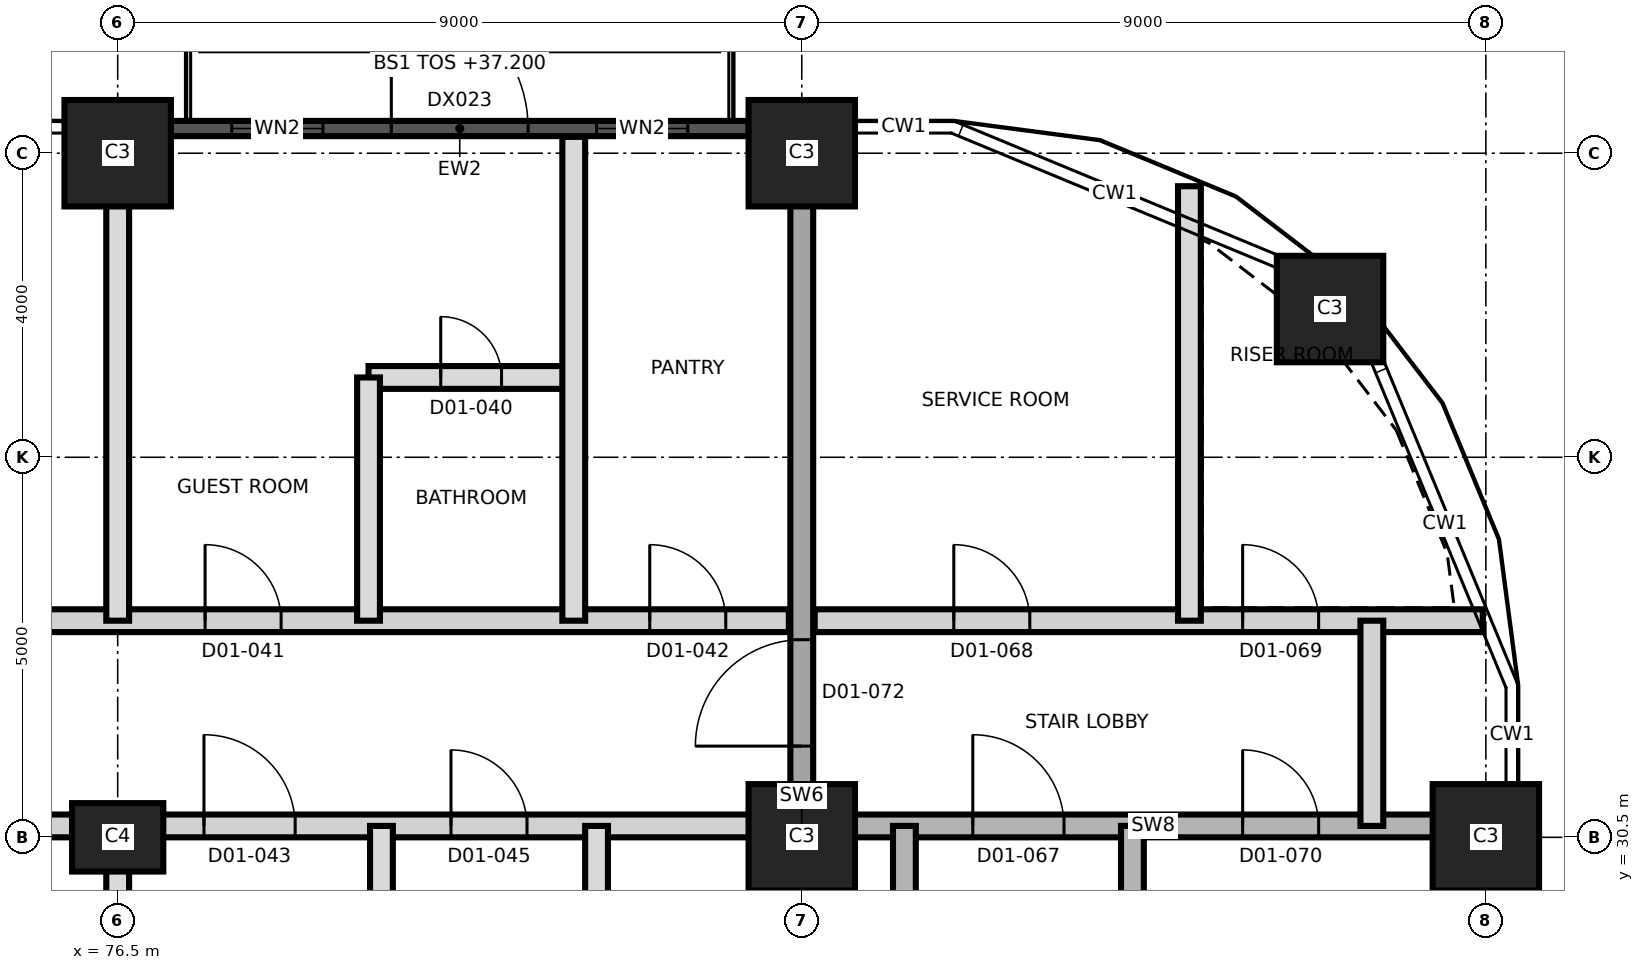
"""IFC4 building model, lengths in metres.
Left out: names, types, materials, properties, quantities, classifications, styles, units other than length and angle.
Written with IfcOpenShell. Run it as: python <this file> out.ifc"""

import sys

from ifc_helpers import new_model, si_unit, direction, frame, frame_2d, origin, origin_2d, place, context, subcontext, project, spatial, rectangle, extrude, element, fill, save


model = new_model("IFC4")
c1 = context("Model", 3, precision=1e-05, world=origin(), true_north=direction((0.0, 1.0)))
c2 = subcontext(c1, "Body", "Model", "MODEL_VIEW")
j1 = project(units=[si_unit("LENGTHUNIT", "METRE"), si_unit("PLANEANGLEUNIT", "RADIAN")], contexts=[c1])
p1 = place(None, origin())
s1 = spatial("IfcSite", under=j1, at=p1, CompositionType="ELEMENT")
p2 = place(p1, origin())
s2 = spatial("IfcBuilding", under=s1, at=p2, CompositionType="ELEMENT")
p3 = place(p2, frame((0.0, 0.0, 37.2)))
s3 = spatial("IfcBuildingStorey", under=s2, at=p3, CompositionType="ELEMENT", Elevation=37.2)
p4 = place(p3, frame((76.5, 30.5, 0.0), z_axis=(0.0, 0.0, 1.0), x_axis=(1.0, 0.0, 0.0)))
e1 = element("IfcColumn", 1, at=p4, inside=s3, PredefinedType="COLUMN", context=c2, shape_type="SweptSolid", body=[
    extrude(rectangle(XDim=1.2, YDim=0.9, at=origin_2d()), origin(), (0.0, 0.0, 1.0), 3.7),
])
for number, where, z_axis, x_axis in (
    (2, (85.5, 30.5, 0.0), (0.0, 0.0, 1.0), (1.0, 0.0, 0.0)),
    (3, (94.5, 30.5, 0.0), (0.0, 0.0, 1.0), (1.0, 0.0, 0.0)),
    (4, (92.45, 37.45, 0.0), (0.0, 0.0, 1.0), (1.0, 0.0, 0.0)),
    (5, (76.5, 39.5, 0.0), (0.0, 0.0, 1.0), (1.0, 0.0, 0.0)),
    (6, (85.5, 39.5, 0.0), (0.0, 0.0, 1.0), (1.0, 0.0, 0.0)),
):
    element("IfcColumn", number, at=place(p3, frame(where, z_axis=z_axis, x_axis=x_axis)), inside=s3, PredefinedType="COLUMN", context=c2, shape_type="SweptSolid", body=[
        extrude(rectangle(XDim=1.4, YDim=1.4, at=origin_2d()), origin(), (0.0, 0.0, 1.0), 3.7),
    ])
p5 = place(p3, frame((85.5, 21.425, 0.0), z_axis=(0.0, 0.0, 1.0), x_axis=(0.0, 1.0, 0.0)))
e7 = element("IfcWall", 7, at=p5, inside=s3, PredefinedType="SHEAR", context=c2, shape_type="SweptSolid", body=[
    extrude(rectangle(XDim=18.15, YDim=0.3, at=frame_2d((9.075, 0.0))), origin(), (0.0, 0.0, 1.0), 3.7),
])
p6 = place(p5, frame((10.275, 0.0, 0.0)))
e8 = element("IfcOpeningElement", 8, at=p6, cuts=e7, PredefinedType="OPENING", context=c2, shape_type="SweptSolid", body=[
    extrude(rectangle(XDim=1.4, YDim=2.1, at=frame_2d((0.7, 1.05))), frame((0.0, 0.16, 0.0), z_axis=(0.0, -1.0, 0.0), x_axis=(1.0, 0.0, 0.0)), (0.0, 0.0, 1.0), 0.32),
])
p7 = place(p3, frame((77.2, 39.825, 0.0), z_axis=(0.0, 0.0, 1.0), x_axis=(1.0, 0.0, 0.0)))
e9 = element("IfcWall", 9, at=p7, inside=s3, PredefinedType="SOLIDWALL", context=c2, shape_type="SweptSolid", body=[
    extrude(rectangle(XDim=7.6, YDim=0.2, at=frame_2d((3.8, 0.0))), origin(), (0.0, 0.0, 1.0), 3.4),
])
p8 = place(p7, frame((2.9, 0.0, 0.0)))
e10 = element("IfcOpeningElement", 10, at=p8, cuts=e9, PredefinedType="OPENING", context=c2, shape_type="SweptSolid", body=[
    extrude(rectangle(XDim=1.8, YDim=2.4, at=frame_2d((0.9, 1.2))), frame((0.0, 0.11, 0.0), z_axis=(0.0, -1.0, 0.0), x_axis=(1.0, 0.0, 0.0)), (0.0, 0.0, 1.0), 0.22),
])
p9 = place(p7, frame((5.6, 0.0, 0.9)))
e11 = element("IfcOpeningElement", 11, at=p9, cuts=e9, PredefinedType="OPENING", context=c2, shape_type="SweptSolid", body=[
    extrude(rectangle(XDim=1.2, YDim=2.1, at=frame_2d((0.6, 1.05))), frame((0.0, 0.11, 0.0), z_axis=(0.0, -1.0, 0.0), x_axis=(1.0, 0.0, 0.0)), (0.0, 0.0, 1.0), 0.22),
])
p10 = place(p7, frame((0.8, 0.0, 0.9)))
e12 = element("IfcOpeningElement", 12, at=p10, cuts=e9, PredefinedType="OPENING", context=c2, shape_type="SweptSolid", body=[
    extrude(rectangle(XDim=1.2, YDim=2.1, at=frame_2d((0.6, 1.05))), frame((0.0, 0.11, 0.0), z_axis=(0.0, -1.0, 0.0), x_axis=(1.0, 0.0, 0.0)), (0.0, 0.0, 1.0), 0.22),
])
p11 = place(p3, frame((58.95, 30.65, 0.0), z_axis=(0.0, 0.0, 1.0), x_axis=(1.0, 0.0, 0.0)))
e13 = element("IfcWall", 13, at=p11, inside=s3, PredefinedType="PARTITIONING", context=c2, shape_type="SweptSolid", body=[
    extrude(rectangle(XDim=26.38, YDim=0.3, at=frame_2d((13.19, 0.0))), origin(), (0.0, 0.0, 1.0), 3.4),
])
p12 = place(p11, frame((2.47, 0.0, 0.0)))
e14 = element("IfcOpeningElement", 14, at=p12, cuts=e13, PredefinedType="OPENING", context=c2, shape_type="SweptSolid", body=[
    extrude(rectangle(XDim=1.0, YDim=2.1, at=frame_2d((0.5, 1.05))), frame((0.0, 0.16, 0.0), z_axis=(0.0, -1.0, 0.0), x_axis=(1.0, 0.0, 0.0)), (0.0, 0.0, 1.0), 0.32),
])
p13 = place(p11, frame((4.27, 0.0, 0.0)))
e15 = element("IfcOpeningElement", 15, at=p13, cuts=e13, PredefinedType="OPENING", context=c2, shape_type="SweptSolid", body=[
    extrude(rectangle(XDim=1.0, YDim=2.1, at=frame_2d((0.5, 1.05))), frame((0.0, 0.16, 0.0), z_axis=(0.0, -1.0, 0.0), x_axis=(1.0, 0.0, 0.0)), (0.0, 0.0, 1.0), 0.32),
])
p14 = place(p11, frame((11.8, 0.0, 0.0)))
e16 = element("IfcOpeningElement", 16, at=p14, cuts=e13, PredefinedType="OPENING", context=c2, shape_type="SweptSolid", body=[
    extrude(rectangle(XDim=1.0, YDim=2.4, at=frame_2d((0.5, 1.2))), frame((0.0, 0.16, 0.0), z_axis=(0.0, -1.0, 0.0), x_axis=(1.0, 0.0, 0.0)), (0.0, 0.0, 1.0), 0.32),
])
p15 = place(p11, frame((13.3, 0.0, 0.0)))
e17 = element("IfcOpeningElement", 17, at=p15, cuts=e13, PredefinedType="OPENING", context=c2, shape_type="SweptSolid", body=[
    extrude(rectangle(XDim=1.0, YDim=2.4, at=frame_2d((0.5, 1.2))), frame((0.0, 0.16, 0.0), z_axis=(0.0, -1.0, 0.0), x_axis=(1.0, 0.0, 0.0)), (0.0, 0.0, 1.0), 0.32),
])
p16 = place(p11, frame((18.685, 0.0, 0.0)))
e18 = element("IfcOpeningElement", 18, at=p16, cuts=e13, PredefinedType="OPENING", context=c2, shape_type="SweptSolid", body=[
    extrude(rectangle(XDim=1.2, YDim=2.1, at=frame_2d((0.6, 1.05))), frame((0.0, 0.16, 0.0), z_axis=(0.0, -1.0, 0.0), x_axis=(1.0, 0.0, 0.0)), (0.0, 0.0, 1.0), 0.32),
])
p17 = place(p11, frame((21.935, 0.0, 0.0)))
e19 = element("IfcOpeningElement", 19, at=p17, cuts=e13, PredefinedType="OPENING", context=c2, shape_type="SweptSolid", body=[
    extrude(rectangle(XDim=1.0, YDim=2.1, at=frame_2d((0.5, 1.05))), frame((0.0, 0.16, 0.0), z_axis=(0.0, -1.0, 0.0), x_axis=(1.0, 0.0, 0.0)), (0.0, 0.0, 1.0), 0.32),
])
p18 = place(p3, frame((85.67, 30.65, 0.0), z_axis=(0.0, 0.0, 1.0), x_axis=(1.0, 0.0, 0.0)))
e20 = element("IfcWall", 20, at=p18, inside=s3, PredefinedType="SHEAR", context=c2, shape_type="SweptSolid", body=[
    extrude(rectangle(XDim=8.905, YDim=0.3, at=frame_2d((4.453, 0.0))), origin(), (0.0, 0.0, 1.0), 3.4),
])
p19 = place(p18, frame((2.08, 0.0, 0.0)))
e21 = element("IfcOpeningElement", 21, at=p19, cuts=e20, PredefinedType="OPENING", context=c2, shape_type="SweptSolid", body=[
    extrude(rectangle(XDim=1.2, YDim=2.1, at=frame_2d((0.6, 1.05))), frame((0.0, 0.16, 0.0), z_axis=(0.0, -1.0, 0.0), x_axis=(1.0, 0.0, 0.0)), (0.0, 0.0, 1.0), 0.32),
])
p20 = place(p18, frame((5.63, 0.0, 0.0)))
e22 = element("IfcOpeningElement", 22, at=p20, cuts=e20, PredefinedType="OPENING", context=c2, shape_type="SweptSolid", body=[
    extrude(rectangle(XDim=1.0, YDim=2.1, at=frame_2d((0.5, 1.05))), frame((0.0, 0.16, 0.0), z_axis=(0.0, -1.0, 0.0), x_axis=(1.0, 0.0, 0.0)), (0.0, 0.0, 1.0), 0.32),
])
p21 = place(p3, frame((58.95, 33.35, 0.0), z_axis=(0.0, 0.0, 1.0), x_axis=(1.0, 0.0, 0.0)))
e23 = element("IfcWall", 23, at=p21, inside=s3, PredefinedType="PARTITIONING", context=c2, shape_type="SweptSolid", body=[
    extrude(rectangle(XDim=26.38, YDim=0.3, at=frame_2d((13.19, 0.0))), origin(), (0.0, 0.0, 1.0), 3.4),
])
p22 = place(p21, frame((1.9, 0.0, 0.0)))
e24 = element("IfcOpeningElement", 24, at=p22, cuts=e23, PredefinedType="OPENING", context=c2, shape_type="SweptSolid", body=[
    extrude(rectangle(XDim=1.0, YDim=2.4, at=frame_2d((0.5, 1.2))), frame((0.0, 0.16, 0.0), z_axis=(0.0, -1.0, 0.0), x_axis=(1.0, 0.0, 0.0)), (0.0, 0.0, 1.0), 0.32),
])
p23 = place(p21, frame((9.7, 0.0, 0.0)))
e25 = element("IfcOpeningElement", 25, at=p23, cuts=e23, PredefinedType="OPENING", context=c2, shape_type="SweptSolid", body=[
    extrude(rectangle(XDim=1.0, YDim=2.1, at=frame_2d((0.5, 1.05))), frame((0.0, 0.16, 0.0), z_axis=(0.0, -1.0, 0.0), x_axis=(1.0, 0.0, 0.0)), (0.0, 0.0, 1.0), 0.32),
])
p24 = place(p21, frame((15.55, 0.0, 0.0)))
e26 = element("IfcOpeningElement", 26, at=p24, cuts=e23, PredefinedType="OPENING", context=c2, shape_type="SweptSolid", body=[
    extrude(rectangle(XDim=1.0, YDim=2.1, at=frame_2d((0.5, 1.05))), frame((0.0, 0.16, 0.0), z_axis=(0.0, -1.0, 0.0), x_axis=(1.0, 0.0, 0.0)), (0.0, 0.0, 1.0), 0.32),
])
p25 = place(p21, frame((18.7, 0.0, 0.0)))
e27 = element("IfcOpeningElement", 27, at=p25, cuts=e23, PredefinedType="OPENING", context=c2, shape_type="SweptSolid", body=[
    extrude(rectangle(XDim=1.0, YDim=2.1, at=frame_2d((0.5, 1.05))), frame((0.0, 0.16, 0.0), z_axis=(0.0, -1.0, 0.0), x_axis=(1.0, 0.0, 0.0)), (0.0, 0.0, 1.0), 0.32),
])
p26 = place(p21, frame((24.55, 0.0, 0.0)))
e28 = element("IfcOpeningElement", 28, at=p26, cuts=e23, PredefinedType="OPENING", context=c2, shape_type="SweptSolid", body=[
    extrude(rectangle(XDim=1.0, YDim=2.1, at=frame_2d((0.5, 1.05))), frame((0.0, 0.16, 0.0), z_axis=(0.0, -1.0, 0.0), x_axis=(1.0, 0.0, 0.0)), (0.0, 0.0, 1.0), 0.32),
])
p27 = place(p3, frame((85.67, 33.35, 0.0), z_axis=(0.0, 0.0, 1.0), x_axis=(1.0, 0.0, 0.0)))
e29 = element("IfcWall", 29, at=p27, inside=s3, PredefinedType="PARTITIONING", context=c2, shape_type="SweptSolid", body=[
    extrude(rectangle(XDim=8.79, YDim=0.3, at=frame_2d((4.395, 0.0))), origin(), (0.0, 0.0, 1.0), 3.4),
])
p28 = place(p27, frame((1.83, 0.0, 0.0)))
e30 = element("IfcOpeningElement", 30, at=p28, cuts=e29, PredefinedType="OPENING", context=c2, shape_type="SweptSolid", body=[
    extrude(rectangle(XDim=1.0, YDim=2.1, at=frame_2d((0.5, 1.05))), frame((0.0, 0.16, 0.0), z_axis=(0.0, -1.0, 0.0), x_axis=(1.0, 0.0, 0.0)), (0.0, 0.0, 1.0), 0.32),
])
p29 = place(p27, frame((5.63, 0.0, 0.0)))
e31 = element("IfcOpeningElement", 31, at=p29, cuts=e29, PredefinedType="OPENING", context=c2, shape_type="SweptSolid", body=[
    extrude(rectangle(XDim=1.0, YDim=2.1, at=frame_2d((0.5, 1.05))), frame((0.0, 0.16, 0.0), z_axis=(0.0, -1.0, 0.0), x_axis=(1.0, 0.0, 0.0)), (0.0, 0.0, 1.0), 0.32),
])
p30 = place(p3, frame((79.8, 36.55, 0.0), z_axis=(0.0, 0.0, 1.0), x_axis=(1.0, 0.0, 0.0)))
e32 = element("IfcWall", 32, at=p30, inside=s3, PredefinedType="PARTITIONING", context=c2, shape_type="SweptSolid", body=[
    extrude(rectangle(XDim=2.7, YDim=0.3, at=frame_2d((1.35, 0.0))), origin(), (0.0, 0.0, 1.0), 3.4),
])
p31 = place(p30, frame((0.95, 0.0, 0.0)))
e33 = element("IfcOpeningElement", 33, at=p31, cuts=e32, PredefinedType="OPENING", context=c2, shape_type="SweptSolid", body=[
    extrude(rectangle(XDim=0.8, YDim=2.1, at=frame_2d((0.4, 1.05))), frame((0.0, 0.16, 0.0), z_axis=(0.0, -1.0, 0.0), x_axis=(1.0, 0.0, 0.0)), (0.0, 0.0, 1.0), 0.32),
])
p32 = place(p3, frame((76.5, 21.425, 0.0), z_axis=(0.0, 0.0, 1.0), x_axis=(0.0, 1.0, 0.0)))
e34 = element("IfcWall", 34, at=p32, inside=s3, PredefinedType="PARTITIONING", context=c2, shape_type="SweptSolid", body=[
    extrude(rectangle(XDim=9.225, YDim=0.3, at=frame_2d((4.612, 0.0))), origin(), (0.0, 0.0, 1.0), 3.4),
])
p33 = place(p3, frame((76.5, 33.35, 0.0), z_axis=(0.0, 0.0, 1.0), x_axis=(0.0, 1.0, 0.0)))
e35 = element("IfcWall", 35, at=p33, inside=s3, PredefinedType="PARTITIONING", context=c2, shape_type="SweptSolid", body=[
    extrude(rectangle(XDim=6.225, YDim=0.3, at=frame_2d((3.112, 0.0))), origin(), (0.0, 0.0, 1.0), 3.4),
])
p34 = place(p3, frame((79.8, 33.35, 0.0), z_axis=(0.0, 0.0, 1.0), x_axis=(0.0, 1.0, 0.0)))
e36 = element("IfcWall", 36, at=p34, inside=s3, PredefinedType="PARTITIONING", context=c2, shape_type="SweptSolid", body=[
    extrude(rectangle(XDim=3.2, YDim=0.3, at=frame_2d((1.6, 0.0))), origin(), (0.0, 0.0, 1.0), 3.4),
])
p35 = place(p3, frame((79.97, 21.425, 0.0), z_axis=(0.0, 0.0, 1.0), x_axis=(0.0, 1.0, 0.0)))
e37 = element("IfcWall", 37, at=p35, inside=s3, PredefinedType="PARTITIONING", context=c2, shape_type="SweptSolid", body=[
    extrude(rectangle(XDim=9.225, YDim=0.3, at=frame_2d((4.612, 0.0))), origin(), (0.0, 0.0, 1.0), 3.4),
])
p36 = place(p3, frame((82.5, 33.35, 0.0), z_axis=(0.0, 0.0, 1.0), x_axis=(0.0, 1.0, 0.0)))
e38 = element("IfcWall", 38, at=p36, inside=s3, PredefinedType="PARTITIONING", context=c2, shape_type="SweptSolid", body=[
    extrude(rectangle(XDim=6.365, YDim=0.3, at=frame_2d((3.183, 0.0))), origin(), (0.0, 0.0, 1.0), 3.4),
])
p37 = place(p3, frame((82.8, 27.45, 0.0), z_axis=(0.0, 0.0, 1.0), x_axis=(0.0, 1.0, 0.0)))
e39 = element("IfcWall", 39, at=p37, inside=s3, PredefinedType="PARTITIONING", context=c2, shape_type="SweptSolid", body=[
    extrude(rectangle(XDim=3.2, YDim=0.3, at=frame_2d((1.6, 0.0))), origin(), (0.0, 0.0, 1.0), 3.4),
])
p38 = place(p3, frame((86.85, 21.8, 0.0), z_axis=(0.0, 0.0, 1.0), x_axis=(0.0, 1.0, 0.0)))
e40 = element("IfcWall", 40, at=p38, inside=s3, PredefinedType="SHEAR", context=c2, shape_type="SweptSolid", body=[
    extrude(rectangle(XDim=8.85, YDim=0.3, at=frame_2d((4.425, 0.0))), origin(), (0.0, 0.0, 1.0), 3.4),
])
p39 = place(p3, frame((89.85, 21.624, 0.0), z_axis=(0.0, 0.0, 1.0), x_axis=(0.0, 1.0, 0.0)))
e41 = element("IfcWall", 41, at=p39, inside=s3, PredefinedType="SHEAR", context=c2, shape_type="SweptSolid", body=[
    extrude(rectangle(XDim=9.026, YDim=0.3, at=frame_2d((4.513, 0.0))), origin(), (0.0, 0.0, 1.0), 3.4),
])
p40 = place(p3, frame((90.6, 33.35, 0.0), z_axis=(0.0, 0.0, 1.0), x_axis=(0.0, 1.0, 0.0)))
e42 = element("IfcWall", 42, at=p40, inside=s3, PredefinedType="PARTITIONING", context=c2, shape_type="SweptSolid", body=[
    extrude(rectangle(XDim=5.716, YDim=0.3, at=frame_2d((2.858, 0.0))), origin(), (0.0, 0.0, 1.0), 3.4),
])
p41 = place(p3, frame((93.0, 30.65, 0.0), z_axis=(0.0, 0.0, 1.0), x_axis=(0.0, 1.0, 0.0)))
e43 = element("IfcWall", 43, at=p41, inside=s3, PredefinedType="PARTITIONING", context=c2, shape_type="SweptSolid", body=[
    extrude(rectangle(XDim=2.7, YDim=0.3, at=frame_2d((1.35, 0.0))), origin(), (0.0, 0.0, 1.0), 3.4),
])
p42 = place(p8, origin())
e44 = element("IfcDoor", 44, at=p42, inside=s3, OperationType="SINGLE_SWING_LEFT", PredefinedType="DOOR", context=c2, shape_type="SweptSolid", body=[
    extrude(rectangle(XDim=1.8, YDim=2.4, at=frame_2d((0.9, 1.2))), frame((0.0, 0.025, 0.0), z_axis=(0.0, -1.0, 0.0), x_axis=(1.0, 0.0, 0.0)), (0.0, 0.0, 1.0), 0.05),
])
fill(e10, e44)
p43 = place(p9, origin())
e45 = element("IfcWindow", 45, at=p43, inside=s3, PartitioningType="SINGLE_PANEL", PredefinedType="WINDOW", context=c2, shape_type="SweptSolid", body=[
    extrude(rectangle(XDim=1.2, YDim=2.1, at=frame_2d((0.6, 1.05))), frame((0.0, 0.03, 0.0), z_axis=(0.0, -1.0, 0.0), x_axis=(1.0, 0.0, 0.0)), (0.0, 0.0, 1.0), 0.06),
])
fill(e11, e45)
p44 = place(p10, origin())
e46 = element("IfcWindow", 46, at=p44, inside=s3, PartitioningType="SINGLE_PANEL", PredefinedType="WINDOW", context=c2, shape_type="SweptSolid", body=[
    extrude(rectangle(XDim=1.2, YDim=2.1, at=frame_2d((0.6, 1.05))), frame((0.0, 0.03, 0.0), z_axis=(0.0, -1.0, 0.0), x_axis=(1.0, 0.0, 0.0)), (0.0, 0.0, 1.0), 0.06),
])
fill(e12, e46)
p45 = place(p31, origin())
e47 = element("IfcDoor", 47, at=p45, inside=s3, OperationType="SINGLE_SWING_RIGHT", PredefinedType="DOOR", context=c2, shape_type="SweptSolid", body=[
    extrude(rectangle(XDim=0.8, YDim=2.1, at=frame_2d((0.4, 1.05))), frame((0.0, 0.025, 0.0), z_axis=(0.0, -1.0, 0.0), x_axis=(1.0, 0.0, 0.0)), (0.0, 0.0, 1.0), 0.05),
])
fill(e33, e47)
p46 = place(p25, origin())
e48 = element("IfcDoor", 48, at=p46, inside=s3, OperationType="SINGLE_SWING_LEFT", PredefinedType="DOOR", context=c2, shape_type="SweptSolid", body=[
    extrude(rectangle(XDim=1.0, YDim=2.1, at=frame_2d((0.5, 1.05))), frame((0.0, 0.025, 0.0), z_axis=(0.0, -1.0, 0.0), x_axis=(1.0, 0.0, 0.0)), (0.0, 0.0, 1.0), 0.05),
])
fill(e27, e48)
p47 = place(p26, origin())
e49 = element("IfcDoor", 49, at=p47, inside=s3, OperationType="SINGLE_SWING_LEFT", PredefinedType="DOOR", context=c2, shape_type="SweptSolid", body=[
    extrude(rectangle(XDim=1.0, YDim=2.1, at=frame_2d((0.5, 1.05))), frame((0.0, 0.025, 0.0), z_axis=(0.0, -1.0, 0.0), x_axis=(1.0, 0.0, 0.0)), (0.0, 0.0, 1.0), 0.05),
])
fill(e28, e49)
p48 = place(p16, origin())
e50 = element("IfcDoor", 50, at=p48, inside=s3, OperationType="SINGLE_SWING_LEFT", PredefinedType="DOOR", context=c2, shape_type="SweptSolid", body=[
    extrude(rectangle(XDim=1.2, YDim=2.1, at=frame_2d((0.6, 1.05))), frame((0.0, 0.025, 0.0), z_axis=(0.0, -1.0, 0.0), x_axis=(1.0, 0.0, 0.0)), (0.0, 0.0, 1.0), 0.05),
])
fill(e18, e50)
p49 = place(p17, origin())
e51 = element("IfcDoor", 51, at=p49, inside=s3, OperationType="SINGLE_SWING_RIGHT", PredefinedType="DOOR", context=c2, shape_type="SweptSolid", body=[
    extrude(rectangle(XDim=1.0, YDim=2.1, at=frame_2d((0.5, 1.05))), frame((0.0, 0.025, 0.0), z_axis=(0.0, -1.0, 0.0), x_axis=(1.0, 0.0, 0.0)), (0.0, 0.0, 1.0), 0.05),
])
fill(e19, e51)
p50 = place(p19, origin())
e52 = element("IfcDoor", 52, at=p50, inside=s3, OperationType="SINGLE_SWING_LEFT", PredefinedType="DOOR", context=c2, shape_type="SweptSolid", body=[
    extrude(rectangle(XDim=1.2, YDim=2.1, at=frame_2d((0.6, 1.05))), frame((0.0, 0.025, 0.0), z_axis=(0.0, -1.0, 0.0), x_axis=(1.0, 0.0, 0.0)), (0.0, 0.0, 1.0), 0.05),
])
fill(e21, e52)
p51 = place(p28, origin())
e53 = element("IfcDoor", 53, at=p51, inside=s3, OperationType="SINGLE_SWING_LEFT", PredefinedType="DOOR", context=c2, shape_type="SweptSolid", body=[
    extrude(rectangle(XDim=1.0, YDim=2.1, at=frame_2d((0.5, 1.05))), frame((0.0, 0.025, 0.0), z_axis=(0.0, -1.0, 0.0), x_axis=(1.0, 0.0, 0.0)), (0.0, 0.0, 1.0), 0.05),
])
fill(e30, e53)
p52 = place(p29, origin())
e54 = element("IfcDoor", 54, at=p52, inside=s3, OperationType="SINGLE_SWING_RIGHT", PredefinedType="DOOR", context=c2, shape_type="SweptSolid", body=[
    extrude(rectangle(XDim=1.0, YDim=2.1, at=frame_2d((0.5, 1.05))), frame((0.0, 0.025, 0.0), z_axis=(0.0, -1.0, 0.0), x_axis=(1.0, 0.0, 0.0)), (0.0, 0.0, 1.0), 0.05),
])
fill(e31, e54)
p53 = place(p20, origin())
e55 = element("IfcDoor", 55, at=p53, inside=s3, OperationType="SINGLE_SWING_LEFT", PredefinedType="DOOR", context=c2, shape_type="SweptSolid", body=[
    extrude(rectangle(XDim=1.0, YDim=2.1, at=frame_2d((0.5, 1.05))), frame((0.0, 0.025, 0.0), z_axis=(0.0, -1.0, 0.0), x_axis=(1.0, 0.0, 0.0)), (0.0, 0.0, 1.0), 0.05),
])
fill(e22, e55)
p54 = place(p6, origin())
e56 = element("IfcDoor", 56, at=p54, inside=s3, OperationType="SINGLE_SWING_RIGHT", PredefinedType="DOOR", context=c2, shape_type="SweptSolid", body=[
    extrude(rectangle(XDim=1.4, YDim=2.1, at=frame_2d((0.7, 1.05))), frame((0.0, 0.025, 0.0), z_axis=(0.0, -1.0, 0.0), x_axis=(1.0, 0.0, 0.0)), (0.0, 0.0, 1.0), 0.05),
])
fill(e8, e56)
save(model, sys.argv[1])
